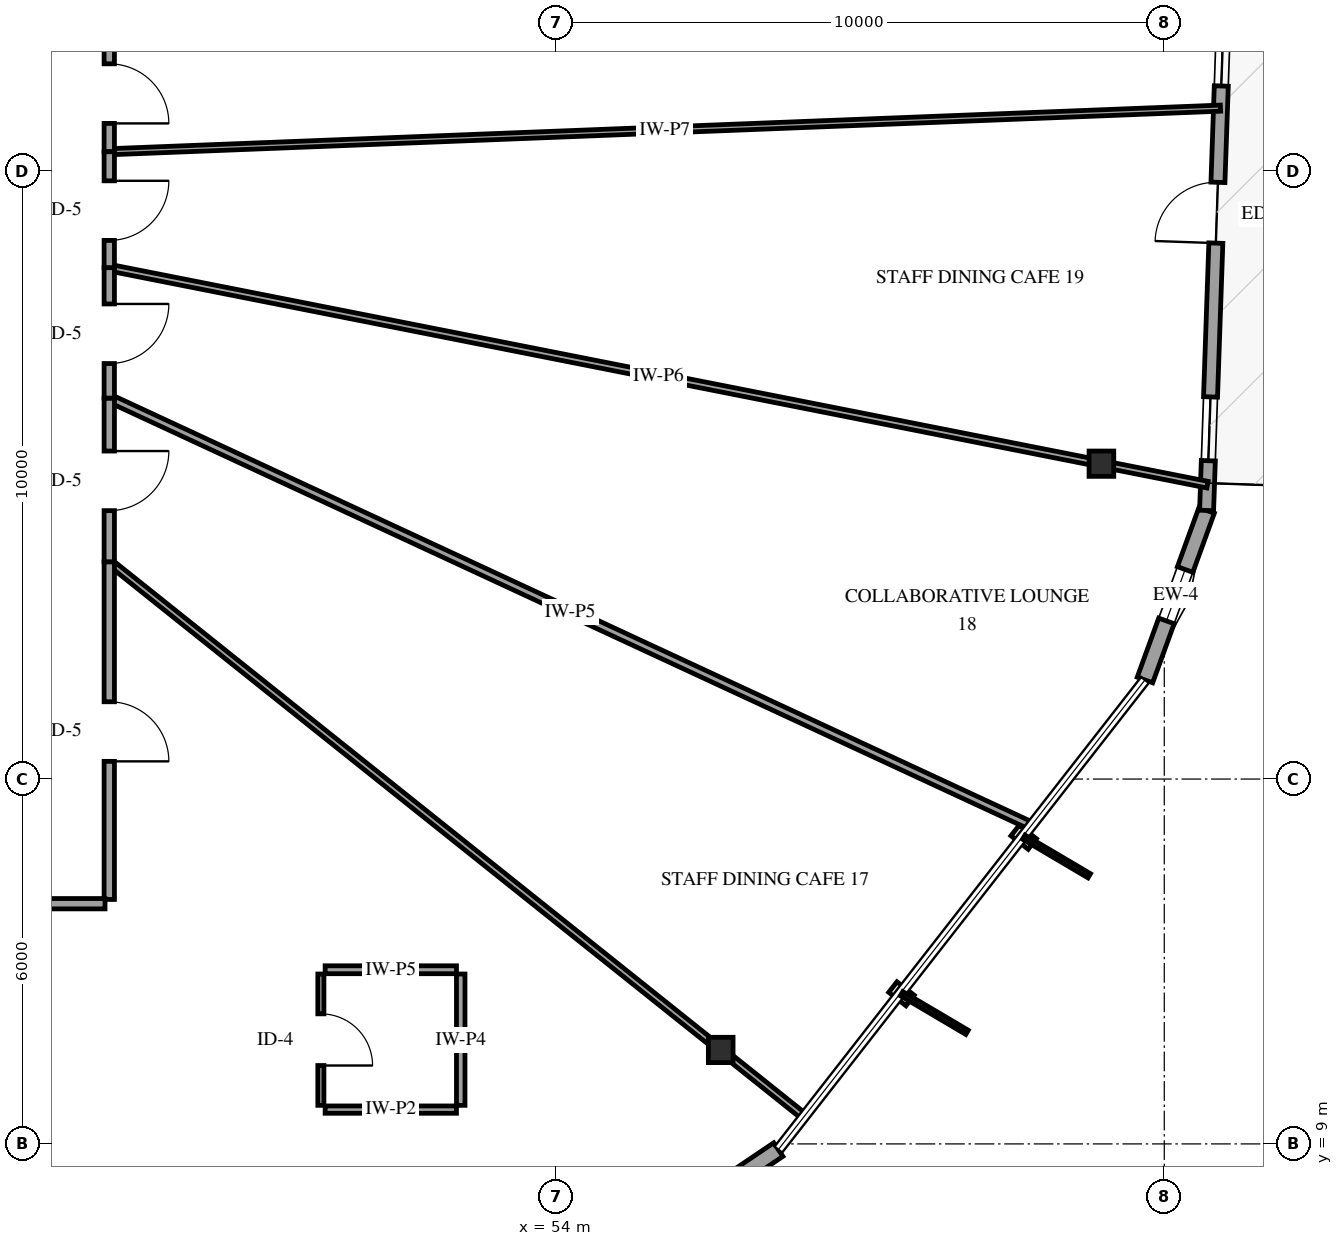
"""IFC4 building model, lengths in metres.
Left out: names, types, materials, properties, quantities, classifications, styles, units other than length and angle.
Written with IfcOpenShell. Run it as: python <this file> out.ifc"""

import sys

from ifc_helpers import new_model, si_unit, direction, frame, frame_2d, origin, origin_2d, place, context, subcontext, project, spatial, rectangle, i_section, extrude, element, fill, save


model = new_model("IFC4")
c1 = context("Model", 3, precision=1e-05, world=origin(), true_north=direction((0.0, 1.0)))
c2 = subcontext(c1, "Body", "Model", "MODEL_VIEW")
j1 = project(units=[si_unit("LENGTHUNIT", "METRE"), si_unit("PLANEANGLEUNIT", "RADIAN")], contexts=[c1])
p1 = place(None, origin())
s1 = spatial("IfcSite", under=j1, at=p1, CompositionType="ELEMENT")
p2 = place(p1, origin())
s2 = spatial("IfcBuilding", under=s1, at=p2, CompositionType="ELEMENT")
p3 = place(p2, frame((0.0, 0.0, 223.0)))
s3 = spatial("IfcBuildingStorey", under=s2, at=p3, CompositionType="ELEMENT", Elevation=223.0)
for number, where, z_axis, x_axis in (
    (1, (56.705, 10.545, 0.0), (0.0, 0.0, 1.0), (1.0, 0.0, 0.0)),
    (2, (62.966, 20.186, 0.0), (0.0, 0.0, 1.0), (1.0, 0.0, 0.0)),
):
    element("IfcColumn", number, at=place(p3, frame(where, z_axis=z_axis, x_axis=x_axis)), inside=s3, PredefinedType="COLUMN", context=c2, shape_type="SweptSolid", body=[
        extrude(i_section(OverallWidth=0.406, OverallDepth=0.416, WebThickness=0.03, FlangeThickness=0.048, FilletRadius=0.038, at=origin_2d()), origin(), (0.0, 0.0, 1.0), 3.6),
    ])
p4 = place(p3, frame((55.194, 7.247, 0.0), z_axis=(0.0, 0.0, 1.0), x_axis=(0.828845811755, 0.559477095453, 0.0)))
e3 = element("IfcWall", 3, at=p4, inside=s3, PredefinedType="SOLIDWALL", context=c2, shape_type="SweptSolid", body=[
    extrude(rectangle(XDim=2.967, YDim=0.27, at=frame_2d((1.483, 0.0))), origin(), (0.0, 0.0, 1.0), 2.679),
])
p5 = place(p4, frame((1.033, 0.0, 0.75)))
e4 = element("IfcOpeningElement", 4, at=p5, cuts=e3, PredefinedType="OPENING", context=c2, shape_type="SweptSolid", body=[
    extrude(rectangle(XDim=0.9, YDim=1.5, at=frame_2d((0.45, 0.75))), frame((0.0, 0.145, 0.0), z_axis=(0.0, -1.0, 0.0), x_axis=(1.0, 0.0, 0.0)), (0.0, 0.0, 1.0), 0.29),
])
p6 = place(p3, frame((63.682, 16.629, 0.0), z_axis=(0.0, 0.0, 1.0), x_axis=(0.341716630291, 0.939803034993, 0.0)))
e5 = element("IfcWall", 5, at=p6, inside=s3, PredefinedType="SOLIDWALL", context=c2, shape_type="SweptSolid", body=[
    extrude(rectangle(XDim=2.966, YDim=0.27, at=frame_2d((1.483, 0.0))), origin(), (0.0, 0.0, 1.0), 2.679),
])
p7 = place(p6, frame((1.033, 0.0, 0.75)))
e6 = element("IfcOpeningElement", 6, at=p7, cuts=e5, PredefinedType="OPENING", context=c2, shape_type="SweptSolid", body=[
    extrude(rectangle(XDim=0.9, YDim=1.5, at=frame_2d((0.45, 0.75))), frame((0.0, 0.145, 0.0), z_axis=(0.0, -1.0, 0.0), x_axis=(1.0, 0.0, 0.0)), (0.0, 0.0, 1.0), 0.29),
])
p8 = place(p3, frame((64.696, 19.417, 0.0), z_axis=(0.0, 0.0, 1.0), x_axis=(0.034536942247, 0.999403421857, 0.0)))
e7 = element("IfcWall", 7, at=p8, inside=s3, PredefinedType="SOLIDWALL", context=c2, shape_type="SweptSolid", body=[
    extrude(rectangle(XDim=9.798, YDim=0.23, at=frame_2d((4.899, 0.0))), origin(), (0.0, 0.0, 1.0), 2.679),
])
p9 = place(p8, frame((4.399, 0.0, 0.0)))
e8 = element("IfcOpeningElement", 8, at=p9, cuts=e7, PredefinedType="OPENING", context=c2, shape_type="SweptSolid", body=[
    extrude(rectangle(XDim=1.0, YDim=2.15, at=frame_2d((0.5, 1.075))), frame((0.0, 0.125, 0.0), z_axis=(0.0, -1.0, 0.0), x_axis=(1.0, 0.0, 0.0)), (0.0, 0.0, 1.0), 0.25),
])
p10 = place(p8, frame((0.818, 0.0, 0.72)))
e9 = element("IfcOpeningElement", 9, at=p10, cuts=e7, PredefinedType="OPENING", context=c2, shape_type="SweptSolid", body=[
    extrude(rectangle(XDim=1.05, YDim=1.55, at=frame_2d((0.525, 0.775))), frame((0.0, 0.125, 0.0), z_axis=(0.0, -1.0, 0.0), x_axis=(1.0, 0.0, 0.0)), (0.0, 0.0, 1.0), 0.25),
])
p11 = place(p8, frame((6.984, 0.0, 0.72)))
e10 = element("IfcOpeningElement", 10, at=p11, cuts=e7, PredefinedType="OPENING", context=c2, shape_type="SweptSolid", body=[
    extrude(rectangle(XDim=1.05, YDim=1.55, at=frame_2d((0.525, 0.775))), frame((0.0, 0.125, 0.0), z_axis=(0.0, -1.0, 0.0), x_axis=(1.0, 0.0, 0.0)), (0.0, 0.0, 1.0), 0.25),
])
p12 = place(p3, frame((46.65, 23.41, 0.0), z_axis=(0.0, 0.0, 1.0), x_axis=(0.981030978901, -0.193851021244, 0.0)))
e11 = element("IfcWall", 11, at=p12, inside=s3, PredefinedType="PARTITIONING", context=c2, shape_type="SweptSolid", body=[
    extrude(rectangle(XDim=18.41, YDim=0.11, at=frame_2d((9.205, 0.0))), origin(), (0.0, 0.0, 1.0), 2.595),
])
p13 = place(p3, frame((64.925, 26.033, 0.0), z_axis=(0.0, 0.0, 1.0), x_axis=(-0.999231161381, -0.039205689947, 0.0)))
e12 = element("IfcWall", 12, at=p13, inside=s3, PredefinedType="PARTITIONING", context=c2, shape_type="SweptSolid", body=[
    extrude(rectangle(XDim=18.289, YDim=0.1, at=frame_2d((9.145, 0.0))), origin(), (0.0, 0.0, 1.0), 3.3),
])
p14 = place(p3, frame((46.65, 21.265, 0.0), z_axis=(0.0, 0.0, 1.0), x_axis=(0.907138854203, -0.420831437984, 0.0)))
e13 = element("IfcWall", 13, at=p14, inside=s3, PredefinedType="PARTITIONING", context=c2, shape_type="SweptSolid", body=[
    extrude(rectangle(XDim=16.712, YDim=0.13, at=frame_2d((8.356, 0.0))), origin(), (0.0, 0.0, 1.0), 3.3),
])
p15 = place(p3, frame((46.65, 18.573, 0.0), z_axis=(0.0, 0.0, 1.0), x_axis=(0.781487424424, -0.623920992968, 0.0)))
e14 = element("IfcWall", 14, at=p15, inside=s3, PredefinedType="PARTITIONING", context=c2, shape_type="SweptSolid", body=[
    extrude(rectangle(XDim=14.622, YDim=0.11, at=frame_2d((7.311, 0.0))), origin(), (0.0, 0.0, 1.0), 3.3),
])
p16 = place(p3, frame((43.383, 12.95, 0.0), z_axis=(0.0, 0.0, 1.0), x_axis=(0.368969393474, -0.929441545596, 0.0)))
e15 = element("IfcWall", 15, at=p16, inside=s3, PredefinedType="PARTITIONING", context=c2, shape_type="SweptSolid", body=[
    extrude(rectangle(XDim=8.784, YDim=0.14, at=frame_2d((4.392, 0.0))), origin(), (0.0, 0.0, 1.0), 2.595),
])
p17 = place(p16, frame((3.967, 0.0, 0.0)))
e16 = element("IfcOpeningElement", 16, at=p17, cuts=e15, PredefinedType="OPENING", context=c2, shape_type="SweptSolid", body=[
    extrude(rectangle(XDim=0.85, YDim=2.1, at=frame_2d((0.425, 1.05))), frame((0.0, 0.08, 0.0), z_axis=(0.0, -1.0, 0.0), x_axis=(1.0, 0.0, 0.0)), (0.0, 0.0, 1.0), 0.16),
])
p18 = place(p3, frame((46.65, 18.573, 0.0), z_axis=(0.0, 0.0, 1.0), x_axis=(0.0, -1.0, 0.0)))
e17 = element("IfcWall", 17, at=p18, inside=s3, PredefinedType="PARTITIONING", context=c2, shape_type="SweptSolid", body=[
    extrude(rectangle(XDim=5.553, YDim=0.17, at=frame_2d((2.776, 0.0))), origin(), (0.0, 0.0, 1.0), 3.3),
])
p19 = place(p18, frame((2.302, 0.0, 0.0)))
e18 = element("IfcOpeningElement", 18, at=p19, cuts=e17, PredefinedType="OPENING", context=c2, shape_type="SweptSolid", body=[
    extrude(rectangle(XDim=0.98, YDim=2.15, at=frame_2d((0.49, 1.075))), frame((0.0, 0.095, 0.0), z_axis=(0.0, -1.0, 0.0), x_axis=(1.0, 0.0, 0.0)), (0.0, 0.0, 1.0), 0.19),
])
p20 = place(p3, frame((46.58, 12.95, 0.0), z_axis=(0.0, 0.0, 1.0), x_axis=(-1.0, 0.0, 0.0)))
e19 = element("IfcWall", 19, at=p20, inside=s3, PredefinedType="PARTITIONING", context=c2, shape_type="SweptSolid", body=[
    extrude(rectangle(XDim=3.197, YDim=0.17, at=frame_2d((1.599, 0.0))), origin(), (0.0, 0.0, 1.0), 3.3),
])
p21 = place(p3, frame((46.65, 21.265, 0.0), z_axis=(0.0, 0.0, 1.0), x_axis=(0.0, -1.0, 0.0)))
e20 = element("IfcWall", 20, at=p21, inside=s3, PredefinedType="PARTITIONING", context=c2, shape_type="SweptSolid", body=[
    extrude(rectangle(XDim=2.692, YDim=0.17, at=frame_2d((1.346, 0.0))), origin(), (0.0, 0.0, 1.0), 3.3),
])
p22 = place(p21, frame((0.871, 0.0, 0.0)))
e21 = element("IfcOpeningElement", 21, at=p22, cuts=e20, PredefinedType="OPENING", context=c2, shape_type="SweptSolid", body=[
    extrude(rectangle(XDim=0.98, YDim=2.15, at=frame_2d((0.49, 1.075))), frame((0.0, 0.095, 0.0), z_axis=(0.0, -1.0, 0.0), x_axis=(1.0, 0.0, 0.0)), (0.0, 0.0, 1.0), 0.19),
])
p23 = place(p3, frame((50.13, 11.794, 0.0), z_axis=(0.0, 0.0, 1.0), x_axis=(0.0, -1.0, 0.0)))
e22 = element("IfcWall", 22, at=p23, inside=s3, PredefinedType="PARTITIONING", context=c2, shape_type="SweptSolid", body=[
    extrude(rectangle(XDim=2.16, YDim=0.1, at=frame_2d((1.08, 0.0))), origin(), (0.0, 0.0, 1.0), 3.3),
])
p24 = place(p23, frame((0.655, 0.0, 0.0)))
e23 = element("IfcOpeningElement", 23, at=p24, cuts=e22, PredefinedType="OPENING", context=c2, shape_type="SweptSolid", body=[
    extrude(rectangle(XDim=0.85, YDim=2.1, at=frame_2d((0.425, 1.05))), frame((0.0, 0.06, 0.0), z_axis=(0.0, -1.0, 0.0), x_axis=(1.0, 0.0, 0.0)), (0.0, 0.0, 1.0), 0.12),
])
p25 = place(p3, frame((52.43, 9.634, 0.0), z_axis=(0.0, 0.0, 1.0), x_axis=(0.0, 1.0, 0.0)))
e24 = element("IfcWall", 24, at=p25, inside=s3, PredefinedType="PARTITIONING", context=c2, shape_type="SweptSolid", body=[
    extrude(rectangle(XDim=2.16, YDim=0.14, at=frame_2d((1.08, 0.0))), origin(), (0.0, 0.0, 1.0), 3.3),
])
p26 = place(p3, frame((52.36, 11.864, 0.0), z_axis=(0.0, 0.0, 1.0), x_axis=(-1.0, 0.0, 0.0)))
e25 = element("IfcWall", 25, at=p26, inside=s3, PredefinedType="PARTITIONING", context=c2, shape_type="SweptSolid", body=[
    extrude(rectangle(XDim=2.16, YDim=0.13, at=frame_2d((1.08, 0.0))), origin(), (0.0, 0.0, 1.0), 3.3),
])
p27 = place(p3, frame((50.2, 9.564, 0.0), z_axis=(0.0, 0.0, 1.0), x_axis=(1.0, 0.0, 0.0)))
e26 = element("IfcWall", 26, at=p27, inside=s3, PredefinedType="PARTITIONING", context=c2, shape_type="SweptSolid", body=[
    extrude(rectangle(XDim=2.16, YDim=0.12, at=frame_2d((1.08, 0.0))), origin(), (0.0, 0.0, 1.0), 3.3),
])
p28 = place(p3, frame((46.65, 23.41, 0.0), z_axis=(0.0, 0.0, 1.0), x_axis=(0.0, -1.0, 0.0)))
e27 = element("IfcWall", 27, at=p28, inside=s3, PredefinedType="PARTITIONING", context=c2, shape_type="SweptSolid", body=[
    extrude(rectangle(XDim=2.145, YDim=0.17, at=frame_2d((1.073, 0.0))), origin(), (0.0, 0.0, 1.0), 3.3),
])
p29 = place(p28, frame((0.597, 0.0, 0.0)))
e28 = element("IfcOpeningElement", 28, at=p29, cuts=e27, PredefinedType="OPENING", context=c2, shape_type="SweptSolid", body=[
    extrude(rectangle(XDim=0.98, YDim=2.15, at=frame_2d((0.49, 1.075))), frame((0.0, 0.095, 0.0), z_axis=(0.0, -1.0, 0.0), x_axis=(1.0, 0.0, 0.0)), (0.0, 0.0, 1.0), 0.19),
])
p30 = place(p3, frame((46.65, 27.258, 0.0), z_axis=(0.0, 0.0, 1.0), x_axis=(0.0, -1.0, 0.0)))
e29 = element("IfcWall", 29, at=p30, inside=s3, PredefinedType="PARTITIONING", context=c2, shape_type="SweptSolid", body=[
    extrude(rectangle(XDim=1.942, YDim=0.17, at=frame_2d((0.971, 0.0))), origin(), (0.0, 0.0, 1.0), 3.3),
])
p31 = place(p30, frame((0.496, 0.0, 0.0)))
e30 = element("IfcOpeningElement", 30, at=p31, cuts=e29, PredefinedType="OPENING", context=c2, shape_type="SweptSolid", body=[
    extrude(rectangle(XDim=0.98, YDim=2.15, at=frame_2d((0.49, 1.075))), frame((0.0, 0.095, 0.0), z_axis=(0.0, -1.0, 0.0), x_axis=(1.0, 0.0, 0.0)), (0.0, 0.0, 1.0), 0.19),
])
p32 = place(p3, frame((46.65, 25.316, 0.0), z_axis=(0.0, 0.0, 1.0), x_axis=(0.0, -1.0, 0.0)))
e31 = element("IfcWall", 31, at=p32, inside=s3, PredefinedType="PARTITIONING", context=c2, shape_type="SweptSolid", body=[
    extrude(rectangle(XDim=1.906, YDim=0.17, at=frame_2d((0.953, 0.0))), origin(), (0.0, 0.0, 1.0), 3.3),
])
p33 = place(p32, frame((0.478, 0.0, 0.0)))
e32 = element("IfcOpeningElement", 32, at=p33, cuts=e31, PredefinedType="OPENING", context=c2, shape_type="SweptSolid", body=[
    extrude(rectangle(XDim=0.98, YDim=2.15, at=frame_2d((0.49, 1.075))), frame((0.0, 0.095, 0.0), z_axis=(0.0, -1.0, 0.0), x_axis=(1.0, 0.0, 0.0)), (0.0, 0.0, 1.0), 0.19),
])
p34 = place(p7, origin())
e33 = element("IfcWindow", 33, at=p34, inside=s3, PartitioningType="SINGLE_PANEL", PredefinedType="WINDOW", context=c2, shape_type="SweptSolid", body=[
    extrude(rectangle(XDim=0.9, YDim=1.5, at=frame_2d((0.45, 0.75))), frame((0.0, 0.03, 0.0), z_axis=(0.0, -1.0, 0.0), x_axis=(1.0, 0.0, 0.0)), (0.0, 0.0, 1.0), 0.06),
])
fill(e6, e33)
p35 = place(p9, origin())
e34 = element("IfcDoor", 34, at=p35, inside=s3, OperationType="SINGLE_SWING_LEFT", PredefinedType="DOOR", context=c2, shape_type="SweptSolid", body=[
    extrude(rectangle(XDim=1.0, YDim=2.15, at=frame_2d((0.5, 1.075))), frame((0.0, 0.025, 0.0), z_axis=(0.0, -1.0, 0.0), x_axis=(1.0, 0.0, 0.0)), (0.0, 0.0, 1.0), 0.05),
])
fill(e8, e34)
p36 = place(p10, origin())
e35 = element("IfcWindow", 35, at=p36, inside=s3, PartitioningType="SINGLE_PANEL", PredefinedType="WINDOW", context=c2, shape_type="SweptSolid", body=[
    extrude(rectangle(XDim=1.05, YDim=1.55, at=frame_2d((0.525, 0.775))), frame((0.0, 0.03, 0.0), z_axis=(0.0, -1.0, 0.0), x_axis=(1.0, 0.0, 0.0)), (0.0, 0.0, 1.0), 0.06),
])
fill(e9, e35)
p37 = place(p11, origin())
e36 = element("IfcWindow", 36, at=p37, inside=s3, PartitioningType="SINGLE_PANEL", PredefinedType="WINDOW", context=c2, shape_type="SweptSolid", body=[
    extrude(rectangle(XDim=1.05, YDim=1.55, at=frame_2d((0.525, 0.775))), frame((0.0, 0.03, 0.0), z_axis=(0.0, -1.0, 0.0), x_axis=(1.0, 0.0, 0.0)), (0.0, 0.0, 1.0), 0.06),
])
fill(e10, e36)
p38 = place(p19, origin())
e37 = element("IfcDoor", 37, at=p38, inside=s3, OperationType="SINGLE_SWING_RIGHT", PredefinedType="DOOR", context=c2, shape_type="SweptSolid", body=[
    extrude(rectangle(XDim=0.98, YDim=2.15, at=frame_2d((0.49, 1.075))), frame((0.0, 0.025, 0.0), z_axis=(0.0, -1.0, 0.0), x_axis=(1.0, 0.0, 0.0)), (0.0, 0.0, 1.0), 0.05),
])
fill(e18, e37)
p39 = place(p22, origin())
e38 = element("IfcDoor", 38, at=p39, inside=s3, OperationType="SINGLE_SWING_LEFT", PredefinedType="DOOR", context=c2, shape_type="SweptSolid", body=[
    extrude(rectangle(XDim=0.98, YDim=2.15, at=frame_2d((0.49, 1.075))), frame((0.0, 0.025, 0.0), z_axis=(0.0, -1.0, 0.0), x_axis=(1.0, 0.0, 0.0)), (0.0, 0.0, 1.0), 0.05),
])
fill(e21, e38)
p40 = place(p24, origin())
e39 = element("IfcDoor", 39, at=p40, inside=s3, OperationType="SINGLE_SWING_RIGHT", PredefinedType="DOOR", context=c2, shape_type="SweptSolid", body=[
    extrude(rectangle(XDim=0.85, YDim=2.1, at=frame_2d((0.425, 1.05))), frame((0.0, 0.025, 0.0), z_axis=(0.0, -1.0, 0.0), x_axis=(1.0, 0.0, 0.0)), (0.0, 0.0, 1.0), 0.05),
])
fill(e23, e39)
p41 = place(p29, origin())
e40 = element("IfcDoor", 40, at=p41, inside=s3, OperationType="SINGLE_SWING_LEFT", PredefinedType="DOOR", context=c2, shape_type="SweptSolid", body=[
    extrude(rectangle(XDim=0.98, YDim=2.15, at=frame_2d((0.49, 1.075))), frame((0.0, 0.025, 0.0), z_axis=(0.0, -1.0, 0.0), x_axis=(1.0, 0.0, 0.0)), (0.0, 0.0, 1.0), 0.05),
])
fill(e28, e40)
p42 = place(p31, origin())
e41 = element("IfcDoor", 41, at=p42, inside=s3, OperationType="SINGLE_SWING_RIGHT", PredefinedType="DOOR", context=c2, shape_type="SweptSolid", body=[
    extrude(rectangle(XDim=0.98, YDim=2.15, at=frame_2d((0.49, 1.075))), frame((0.0, 0.025, 0.0), z_axis=(0.0, -1.0, 0.0), x_axis=(1.0, 0.0, 0.0)), (0.0, 0.0, 1.0), 0.05),
])
fill(e30, e41)
p43 = place(p33, origin())
e42 = element("IfcDoor", 42, at=p43, inside=s3, OperationType="SINGLE_SWING_LEFT", PredefinedType="DOOR", context=c2, shape_type="SweptSolid", body=[
    extrude(rectangle(XDim=0.98, YDim=2.15, at=frame_2d((0.49, 1.075))), frame((0.0, 0.025, 0.0), z_axis=(0.0, -1.0, 0.0), x_axis=(1.0, 0.0, 0.0)), (0.0, 0.0, 1.0), 0.05),
])
fill(e32, e42)
save(model, sys.argv[1])
